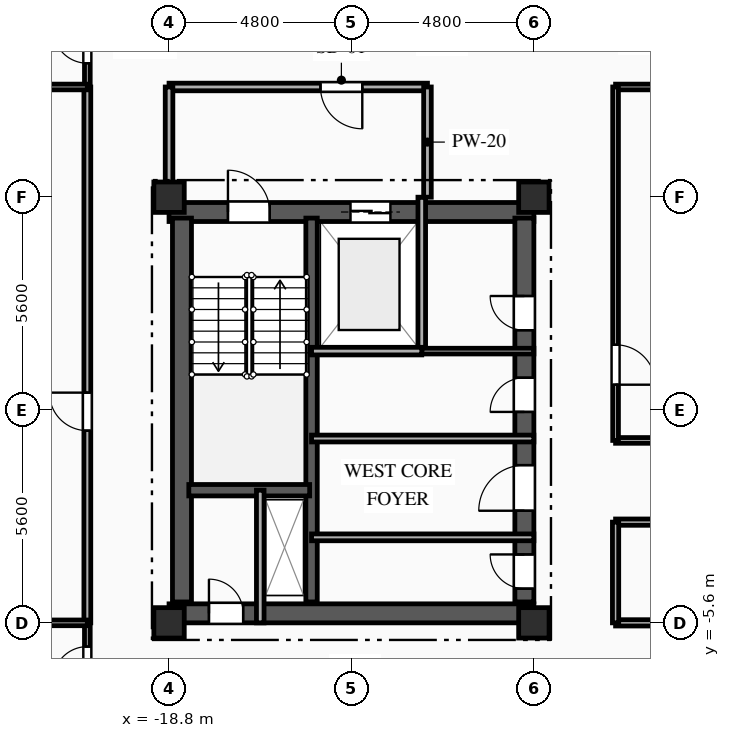
"""IFC4 building model, lengths in metres.
Left out: names, types, materials, properties, quantities, classifications, styles, units other than length and angle.
Written with IfcOpenShell. Run it as: python <this file> out.ifc"""

import sys

from ifc_helpers import new_model, si_unit, direction, frame, frame_2d, origin, origin_2d, place, context, subcontext, project, spatial, rectangle, extrude, element, fill, save


model = new_model("IFC4")
c1 = context("Model", 3, precision=1e-05, world=origin(), true_north=direction((0.0, 1.0)))
c2 = subcontext(c1, "Body", "Model", "MODEL_VIEW")
j1 = project(units=[si_unit("LENGTHUNIT", "METRE"), si_unit("PLANEANGLEUNIT", "RADIAN")], contexts=[c1])
p1 = place(None, origin())
s1 = spatial("IfcSite", under=j1, at=p1, CompositionType="ELEMENT")
p2 = place(p1, origin())
s2 = spatial("IfcBuilding", under=s1, at=p2, CompositionType="ELEMENT")
p3 = place(p2, frame((0.0, 0.0, 179.65)))
s3 = spatial("IfcBuildingStorey", under=s2, at=p3, CompositionType="ELEMENT", Elevation=179.65)
for number, where, z_axis, x_axis in (
    (1, (-18.8, -5.6, 0.0), (0.0, 0.0, 1.0), (1.0, 0.0, 0.0)),
    (2, (-18.8, 5.6, 0.0), (0.0, 0.0, 1.0), (1.0, 0.0, 0.0)),
    (3, (-9.2, -5.6, 0.0), (0.0, 0.0, 1.0), (1.0, 0.0, 0.0)),
    (4, (-9.2, 5.6, 0.0), (0.0, 0.0, 1.0), (1.0, 0.0, 0.0)),
):
    element("IfcColumn", number, at=place(p3, frame(where, z_axis=z_axis, x_axis=x_axis)), inside=s3, PredefinedType="COLUMN", context=c2, shape_type="SweptSolid", body=[
        extrude(rectangle(XDim=0.8, YDim=0.8, at=origin_2d()), origin(), (0.0, 0.0, 1.0), 3.35),
    ])
p4 = place(p3, frame((-18.8, 5.21, 0.0), z_axis=(0.0, 0.0, 1.0), x_axis=(1.0, 0.0, 0.0)))
e5 = element("IfcWall", 5, at=p4, inside=s3, PredefinedType="SHEAR", context=c2, shape_type="SweptSolid", body=[
    extrude(rectangle(XDim=9.6, YDim=0.5, at=frame_2d((4.8, 0.0))), origin(), (0.0, 0.0, 1.0), 3.04),
])
p5 = place(p4, frame((1.55, 0.0, 0.0)))
e6 = element("IfcOpeningElement", 6, at=p5, cuts=e5, PredefinedType="OPENING", context=c2, shape_type="SweptSolid", body=[
    extrude(rectangle(XDim=1.1, YDim=2.15, at=frame_2d((0.55, 1.075))), frame((0.0, 0.26, 0.0), z_axis=(0.0, -1.0, 0.0), x_axis=(1.0, 0.0, 0.0)), (0.0, 0.0, 1.0), 0.52),
])
p6 = place(p4, frame((4.775, 0.0, 0.0)))
e7 = element("IfcOpeningElement", 7, at=p6, cuts=e5, PredefinedType="OPENING", context=c2, shape_type="SweptSolid", body=[
    extrude(rectangle(XDim=1.05, YDim=2.1, at=frame_2d((0.525, 1.05))), frame((0.0, 0.26, 0.0), z_axis=(0.0, -1.0, 0.0), x_axis=(1.0, 0.0, 0.0)), (0.0, 0.0, 1.0), 0.52),
])
p7 = place(p3, frame((-18.8, -5.35, 0.0), z_axis=(0.0, 0.0, 1.0), x_axis=(1.0, 0.0, 0.0)))
e8 = element("IfcWall", 8, at=p7, inside=s3, PredefinedType="SHEAR", context=c2, shape_type="SweptSolid", body=[
    extrude(rectangle(XDim=9.6, YDim=0.5, at=frame_2d((4.8, 0.0))), origin(), (0.0, 0.0, 1.0), 3.04),
])
p8 = place(p7, frame((1.05, 0.0, 0.0)))
e9 = element("IfcOpeningElement", 9, at=p8, cuts=e8, PredefinedType="OPENING", context=c2, shape_type="SweptSolid", body=[
    extrude(rectangle(XDim=0.9, YDim=2.1, at=frame_2d((0.45, 1.05))), frame((0.0, 0.26, 0.0), z_axis=(0.0, -1.0, 0.0), x_axis=(1.0, 0.0, 0.0)), (0.0, 0.0, 1.0), 0.52),
])
p9 = place(p3, frame((-18.46, -5.05, 0.0), z_axis=(0.0, 0.0, 1.0), x_axis=(0.0, 1.0, 0.0)))
e10 = element("IfcWall", 10, at=p9, inside=s3, PredefinedType="SHEAR", context=c2, shape_type="SweptSolid", body=[
    extrude(rectangle(XDim=10.1, YDim=0.5, at=frame_2d((5.05, 0.0))), origin(), (0.0, 0.0, 1.0), 3.04),
])
p10 = place(p3, frame((-9.45, -5.05, 0.0), z_axis=(0.0, 0.0, 1.0), x_axis=(0.0, 1.0, 0.0)))
e11 = element("IfcWall", 11, at=p10, inside=s3, PredefinedType="SHEAR", context=c2, shape_type="SweptSolid", body=[
    extrude(rectangle(XDim=10.1, YDim=0.5, at=frame_2d((5.05, 0.0))), origin(), (0.0, 0.0, 1.0), 3.04),
])
p11 = place(p10, frame((7.15, 0.0, 0.0)))
e12 = element("IfcOpeningElement", 12, at=p11, cuts=e11, PredefinedType="OPENING", context=c2, shape_type="SweptSolid", body=[
    extrude(rectangle(XDim=0.9, YDim=2.1, at=frame_2d((0.45, 1.05))), frame((0.0, 0.26, 0.0), z_axis=(0.0, -1.0, 0.0), x_axis=(1.0, 0.0, 0.0)), (0.0, 0.0, 1.0), 0.52),
])
p12 = place(p10, frame((2.4, 0.0, 0.0)))
e13 = element("IfcOpeningElement", 13, at=p12, cuts=e11, PredefinedType="OPENING", context=c2, shape_type="SweptSolid", body=[
    extrude(rectangle(XDim=1.2, YDim=2.15, at=frame_2d((0.6, 1.075))), frame((0.0, 0.26, 0.0), z_axis=(0.0, -1.0, 0.0), x_axis=(1.0, 0.0, 0.0)), (0.0, 0.0, 1.0), 0.52),
])
p13 = place(p10, frame((0.35, 0.0, 0.0)))
e14 = element("IfcOpeningElement", 14, at=p13, cuts=e11, PredefinedType="OPENING", context=c2, shape_type="SweptSolid", body=[
    extrude(rectangle(XDim=0.9, YDim=2.1, at=frame_2d((0.45, 1.05))), frame((0.0, 0.26, 0.0), z_axis=(0.0, -1.0, 0.0), x_axis=(1.0, 0.0, 0.0)), (0.0, 0.0, 1.0), 0.52),
])
p14 = place(p10, frame((5.0, 0.0, 0.0)))
e15 = element("IfcOpeningElement", 15, at=p14, cuts=e11, PredefinedType="OPENING", context=c2, shape_type="SweptSolid", body=[
    extrude(rectangle(XDim=0.9, YDim=2.1, at=frame_2d((0.45, 1.05))), frame((0.0, 0.26, 0.0), z_axis=(0.0, -1.0, 0.0), x_axis=(1.0, 0.0, 0.0)), (0.0, 0.0, 1.0), 0.52),
])
p15 = place(p3, frame((-15.05, -5.05, 0.0), z_axis=(0.0, 0.0, 1.0), x_axis=(0.0, 1.0, 0.0)))
e16 = element("IfcWall", 16, at=p15, inside=s3, PredefinedType="SHEAR", context=c2, shape_type="SweptSolid", body=[
    extrude(rectangle(XDim=10.1, YDim=0.3, at=frame_2d((5.05, 0.0))), origin(), (0.0, 0.0, 1.0), 3.04),
])
p16 = place(p3, frame((-18.28, -2.11, 0.0), z_axis=(0.0, 0.0, 1.0), x_axis=(1.0, 0.0, 0.0)))
e17 = element("IfcWall", 17, at=p16, inside=s3, PredefinedType="SHEAR", context=c2, shape_type="SweptSolid", body=[
    extrude(rectangle(XDim=3.18, YDim=0.3, at=frame_2d((1.59, 0.0))), origin(), (0.0, 0.0, 1.0), 3.04),
])
p17 = place(p3, frame((-16.4, -5.6, 0.0), z_axis=(0.0, 0.0, 1.0), x_axis=(0.0, 1.0, 0.0)))
e18 = element("IfcWall", 18, at=p17, inside=s3, PredefinedType="PARTITIONING", context=c2, shape_type="SweptSolid", body=[
    extrude(rectangle(XDim=3.49, YDim=0.2, at=frame_2d((1.745, 0.0))), origin(), (0.0, 0.0, 1.0), 3.04),
])
p18 = place(p3, frame((-12.15, 1.55, 0.0), z_axis=(0.0, 0.0, 1.0), x_axis=(0.0, 1.0, 0.0)))
e19 = element("IfcWall", 19, at=p18, inside=s3, PredefinedType="PARTITIONING", context=c2, shape_type="SweptSolid", body=[
    extrude(rectangle(XDim=4.05, YDim=0.2, at=frame_2d((2.025, 0.0))), origin(), (0.0, 0.0, 1.0), 3.04),
])
p19 = place(p3, frame((-12.0, 8.5, 0.0), z_axis=(0.0, 0.0, 1.0), x_axis=(-1.0, 0.0, 0.0)))
e20 = element("IfcWall", 20, at=p19, inside=s3, PredefinedType="PARTITIONING", context=c2, shape_type="SweptSolid", body=[
    extrude(rectangle(XDim=6.8, YDim=0.2, at=frame_2d((3.4, 0.0))), origin(), (0.0, 0.0, 1.0), 3.04),
])
p20 = place(p19, frame((1.715, 0.0, 0.0)))
e21 = element("IfcOpeningElement", 21, at=p20, cuts=e20, PredefinedType="OPENING", context=c2, shape_type="SweptSolid", body=[
    extrude(rectangle(XDim=1.1, YDim=2.15, at=frame_2d((0.55, 1.075))), frame((0.0, 0.11, 0.0), z_axis=(0.0, -1.0, 0.0), x_axis=(1.0, 0.0, 0.0)), (0.0, 0.0, 1.0), 0.22),
])
p21 = place(p3, frame((-18.8, 8.5, 0.0), z_axis=(0.0, 0.0, 1.0), x_axis=(0.0, -1.0, 0.0)))
e22 = element("IfcWall", 22, at=p21, inside=s3, PredefinedType="PARTITIONING", context=c2, shape_type="SweptSolid", body=[
    extrude(rectangle(XDim=2.9, YDim=0.2, at=frame_2d((1.45, 0.0))), origin(), (0.0, 0.0, 1.0), 2.665),
])
p22 = place(p3, frame((-12.0, 5.6, 0.0), z_axis=(0.0, 0.0, 1.0), x_axis=(0.0, 1.0, 0.0)))
e23 = element("IfcWall", 23, at=p22, inside=s3, PredefinedType="PARTITIONING", context=c2, shape_type="SweptSolid", body=[
    extrude(rectangle(XDim=2.9, YDim=0.2, at=frame_2d((1.45, 0.0))), origin(), (0.0, 0.0, 1.0), 3.04),
])
p23 = place(p3, frame((-12.15, 1.55, 0.0), z_axis=(0.0, 0.0, 1.0), x_axis=(1.0, 0.0, 0.0)))
e24 = element("IfcWall", 24, at=p23, inside=s3, PredefinedType="PARTITIONING", context=c2, shape_type="SweptSolid", body=[
    extrude(rectangle(XDim=2.95, YDim=0.15, at=frame_2d((1.475, 0.0))), origin(), (0.0, 0.0, 1.0), 3.04),
])
p24 = place(p3, frame((-15.05, -3.35, 0.0), z_axis=(0.0, 0.0, 1.0), x_axis=(1.0, 0.0, 0.0)))
e25 = element("IfcWall", 25, at=p24, inside=s3, PredefinedType="PARTITIONING", context=c2, shape_type="SweptSolid", body=[
    extrude(rectangle(XDim=5.85, YDim=0.18, at=frame_2d((2.925, 0.0))), origin(), (0.0, 0.0, 1.0), 2.755),
])
p25 = place(p3, frame((-9.2, -0.75, 0.0), z_axis=(0.0, 0.0, 1.0), x_axis=(-1.0, 0.0, 0.0)))
e26 = element("IfcWall", 26, at=p25, inside=s3, PredefinedType="PARTITIONING", context=c2, shape_type="SweptSolid", body=[
    extrude(rectangle(XDim=5.85, YDim=0.18, at=frame_2d((2.925, 0.0))), origin(), (0.0, 0.0, 1.0), 3.04),
])
p26 = place(p3, frame((-20.95, 8.5, 0.0), z_axis=(0.0, 0.0, 1.0), x_axis=(0.0, 1.0, 0.0)))
e27 = element("IfcWall", 27, at=p26, inside=s3, PredefinedType="PARTITIONING", context=c2, shape_type="SweptSolid", body=[
    extrude(rectangle(XDim=2.15, YDim=0.15, at=frame_2d((1.075, 0.0))), origin(), (0.0, 0.0, 1.0), 3.04),
])
p27 = place(p26, frame((0.625, 0.0, 0.0)))
e28 = element("IfcOpeningElement", 28, at=p27, cuts=e27, PredefinedType="OPENING", context=c2, shape_type="SweptSolid", body=[
    extrude(rectangle(XDim=0.9, YDim=2.1, at=frame_2d((0.45, 1.05))), frame((0.0, 0.085, 0.0), z_axis=(0.0, -1.0, 0.0), x_axis=(1.0, 0.0, 0.0)), (0.0, 0.0, 1.0), 0.17),
])
p28 = place(p3, frame((0.0, 8.5, 0.0), z_axis=(0.0, 0.0, 1.0), x_axis=(-1.0, 0.0, 0.0)))
e29 = element("IfcWall", 29, at=p28, inside=s3, PredefinedType="PARTITIONING", context=c2, shape_type="SweptSolid", body=[
    extrude(rectangle(XDim=7.05, YDim=0.15, at=frame_2d((3.525, 0.0))), origin(), (0.0, 0.0, 1.0), 3.04),
])
p29 = place(p3, frame((-20.95, -7.75, 0.0), z_axis=(0.0, 0.0, 1.0), x_axis=(0.0, 1.0, 0.0)))
e30 = element("IfcWall", 30, at=p29, inside=s3, PredefinedType="PARTITIONING", context=c2, shape_type="SweptSolid", body=[
    extrude(rectangle(XDim=2.15, YDim=0.15, at=frame_2d((1.075, 0.0))), origin(), (0.0, 0.0, 1.0), 3.04),
])
p30 = place(p29, frame((0.625, 0.0, 0.0)))
e31 = element("IfcOpeningElement", 31, at=p30, cuts=e30, PredefinedType="OPENING", context=c2, shape_type="SweptSolid", body=[
    extrude(rectangle(XDim=0.9, YDim=2.1, at=frame_2d((0.45, 1.05))), frame((0.0, 0.085, 0.0), z_axis=(0.0, -1.0, 0.0), x_axis=(1.0, 0.0, 0.0)), (0.0, 0.0, 1.0), 0.17),
])
p31 = place(p3, frame((-7.05, -5.6, 0.0), z_axis=(0.0, 0.0, 1.0), x_axis=(1.0, 0.0, 0.0)))
e32 = element("IfcWall", 32, at=p31, inside=s3, PredefinedType="PARTITIONING", context=c2, shape_type="SweptSolid", body=[
    extrude(rectangle(XDim=7.05, YDim=0.165, at=frame_2d((3.525, 0.0))), origin(), (0.0, 0.0, 1.0), 2.525),
])
p32 = place(p3, frame((-20.95, -5.6, 0.0), z_axis=(0.0, 0.0, 1.0), x_axis=(0.0, 1.0, 0.0)))
e33 = element("IfcWall", 33, at=p32, inside=s3, PredefinedType="PARTITIONING", context=c2, shape_type="SweptSolid", body=[
    extrude(rectangle(XDim=14.1, YDim=0.18, at=frame_2d((7.05, 0.0))), origin(), (0.0, 0.0, 1.0), 3.04),
])
p33 = place(p32, frame((5.058, 0.0, 0.0)))
e34 = element("IfcOpeningElement", 34, at=p33, cuts=e33, PredefinedType="OPENING", context=c2, shape_type="SweptSolid", body=[
    extrude(rectangle(XDim=1.0, YDim=2.15, at=frame_2d((0.5, 1.075))), frame((0.0, 0.1, 0.0), z_axis=(0.0, -1.0, 0.0), x_axis=(1.0, 0.0, 0.0)), (0.0, 0.0, 1.0), 0.2),
])
p34 = place(p3, frame((-7.05, -0.8, 0.0), z_axis=(0.0, 0.0, 1.0), x_axis=(1.0, 0.0, 0.0)))
e35 = element("IfcWall", 35, at=p34, inside=s3, PredefinedType="PARTITIONING", context=c2, shape_type="SweptSolid", body=[
    extrude(rectangle(XDim=7.05, YDim=0.15, at=frame_2d((3.525, 0.0))), origin(), (0.0, 0.0, 1.0), 3.04),
])
p35 = place(p3, frame((7.05, -2.95, 0.0), z_axis=(0.0, 0.0, 1.0), x_axis=(-1.0, 0.0, 0.0)))
e36 = element("IfcWall", 36, at=p35, inside=s3, PredefinedType="PARTITIONING", context=c2, shape_type="SweptSolid", body=[
    extrude(rectangle(XDim=14.1, YDim=0.165, at=frame_2d((7.05, 0.0))), origin(), (0.0, 0.0, 1.0), 3.04),
])
p36 = place(p35, frame((6.475, 0.0, 0.0)))
e37 = element("IfcOpeningElement", 37, at=p36, cuts=e36, PredefinedType="OPENING", context=c2, shape_type="SweptSolid", body=[
    extrude(rectangle(XDim=1.15, YDim=2.15, at=frame_2d((0.575, 1.075))), frame((0.0, 0.093, 0.0), z_axis=(0.0, -1.0, 0.0), x_axis=(1.0, 0.0, 0.0)), (0.0, 0.0, 1.0), 0.185),
])
p37 = place(p3, frame((-7.05, 8.5, 0.0), z_axis=(0.0, 0.0, 1.0), x_axis=(0.0, -1.0, 0.0)))
e38 = element("IfcWall", 38, at=p37, inside=s3, PredefinedType="PARTITIONING", context=c2, shape_type="SweptSolid", body=[
    extrude(rectangle(XDim=9.3, YDim=0.15, at=frame_2d((4.65, 0.0))), origin(), (0.0, 0.0, 1.0), 3.04),
])
p38 = place(p37, frame((6.784, 0.0, 0.0)))
e39 = element("IfcOpeningElement", 39, at=p38, cuts=e38, PredefinedType="OPENING", context=c2, shape_type="SweptSolid", body=[
    extrude(rectangle(XDim=1.05, YDim=2.15, at=frame_2d((0.525, 1.075))), frame((0.0, 0.085, 0.0), z_axis=(0.0, -1.0, 0.0), x_axis=(1.0, 0.0, 0.0)), (0.0, 0.0, 1.0), 0.17),
])
p39 = place(p3, frame((-7.05, -2.95, 0.0), z_axis=(0.0, 0.0, 1.0), x_axis=(0.0, -1.0, 0.0)))
e40 = element("IfcWall", 40, at=p39, inside=s3, PredefinedType="PARTITIONING", context=c2, shape_type="SweptSolid", body=[
    extrude(rectangle(XDim=2.65, YDim=0.165, at=frame_2d((1.325, 0.0))), origin(), (0.0, 0.0, 1.0), 3.04),
])
p40 = place(p3, frame((-23.6, 8.5, 0.0), z_axis=(0.0, 0.0, 1.0), x_axis=(1.0, 0.0, 0.0)))
e41 = element("IfcWall", 41, at=p40, inside=s3, PredefinedType="PARTITIONING", context=c2, shape_type="SweptSolid", body=[
    extrude(rectangle(XDim=2.65, YDim=0.15, at=frame_2d((1.325, 0.0))), origin(), (0.0, 0.0, 1.0), 3.04),
])
p41 = place(p40, frame((0.635, 0.0, 0.0)))
e42 = element("IfcOpeningElement", 42, at=p41, cuts=e41, PredefinedType="OPENING", context=c2, shape_type="SweptSolid", body=[
    extrude(rectangle(XDim=1.05, YDim=2.15, at=frame_2d((0.525, 1.075))), frame((0.0, 0.085, 0.0), z_axis=(0.0, -1.0, 0.0), x_axis=(1.0, 0.0, 0.0)), (0.0, 0.0, 1.0), 0.17),
])
p42 = place(p3, frame((-20.95, -5.6, 0.0), z_axis=(0.0, 0.0, 1.0), x_axis=(-1.0, 0.0, 0.0)))
e43 = element("IfcWall", 43, at=p42, inside=s3, PredefinedType="PARTITIONING", context=c2, shape_type="SweptSolid", body=[
    extrude(rectangle(XDim=2.65, YDim=0.15, at=frame_2d((1.325, 0.0))), origin(), (0.0, 0.0, 1.0), 3.04),
])
p43 = place(p42, frame((0.965, 0.0, 0.0)))
e44 = element("IfcOpeningElement", 44, at=p43, cuts=e43, PredefinedType="OPENING", context=c2, shape_type="SweptSolid", body=[
    extrude(rectangle(XDim=1.05, YDim=2.15, at=frame_2d((0.525, 1.075))), frame((0.0, 0.085, 0.0), z_axis=(0.0, -1.0, 0.0), x_axis=(1.0, 0.0, 0.0)), (0.0, 0.0, 1.0), 0.17),
])
p44 = place(p3, frame((-15.05, 1.55, 0.0), z_axis=(0.0, 0.0, 1.0), x_axis=(1.0, 0.0, 0.0)))
e45 = element("IfcWall", 45, at=p44, inside=s3, PredefinedType="PARTITIONING", context=c2, shape_type="SweptSolid", body=[
    extrude(rectangle(XDim=2.9, YDim=0.2, at=frame_2d((1.45, 0.0))), origin(), (0.0, 0.0, 1.0), 3.04),
])
p45 = place(p5, origin())
e46 = element("IfcDoor", 46, at=p45, inside=s3, OperationType="SINGLE_SWING_LEFT", PredefinedType="DOOR", context=c2, shape_type="SweptSolid", body=[
    extrude(rectangle(XDim=1.1, YDim=2.15, at=frame_2d((0.55, 1.075))), frame((0.0, 0.025, 0.0), z_axis=(0.0, -1.0, 0.0), x_axis=(1.0, 0.0, 0.0)), (0.0, 0.0, 1.0), 0.05),
])
fill(e6, e46)
p46 = place(p6, origin())
e47 = element("IfcDoor", 47, at=p46, inside=s3, OperationType="DOUBLE_DOOR_SLIDING", PredefinedType="DOOR", context=c2, shape_type="SweptSolid", body=[
    extrude(rectangle(XDim=1.05, YDim=2.1, at=frame_2d((0.525, 1.05))), frame((0.0, 0.025, 0.0), z_axis=(0.0, -1.0, 0.0), x_axis=(1.0, 0.0, 0.0)), (0.0, 0.0, 1.0), 0.05),
])
fill(e7, e47)
p47 = place(p8, origin())
e48 = element("IfcDoor", 48, at=p47, inside=s3, OperationType="SINGLE_SWING_LEFT", PredefinedType="DOOR", context=c2, shape_type="SweptSolid", body=[
    extrude(rectangle(XDim=0.9, YDim=2.1, at=frame_2d((0.45, 1.05))), frame((0.0, 0.025, 0.0), z_axis=(0.0, -1.0, 0.0), x_axis=(1.0, 0.0, 0.0)), (0.0, 0.0, 1.0), 0.05),
])
fill(e9, e48)
p48 = place(p20, origin())
e49 = element("IfcDoor", 49, at=p48, inside=s3, OperationType="SINGLE_SWING_LEFT", PredefinedType="DOOR", context=c2, shape_type="SweptSolid", body=[
    extrude(rectangle(XDim=1.1, YDim=2.15, at=frame_2d((0.55, 1.075))), frame((0.0, 0.025, 0.0), z_axis=(0.0, -1.0, 0.0), x_axis=(1.0, 0.0, 0.0)), (0.0, 0.0, 1.0), 0.05),
])
fill(e21, e49)
p49 = place(p11, origin())
e50 = element("IfcDoor", 50, at=p49, inside=s3, OperationType="SINGLE_SWING_RIGHT", PredefinedType="DOOR", context=c2, shape_type="SweptSolid", body=[
    extrude(rectangle(XDim=0.9, YDim=2.1, at=frame_2d((0.45, 1.05))), frame((0.0, 0.025, 0.0), z_axis=(0.0, -1.0, 0.0), x_axis=(1.0, 0.0, 0.0)), (0.0, 0.0, 1.0), 0.05),
])
fill(e12, e50)
p50 = place(p12, origin())
e51 = element("IfcDoor", 51, at=p50, inside=s3, OperationType="SINGLE_SWING_LEFT", PredefinedType="DOOR", context=c2, shape_type="SweptSolid", body=[
    extrude(rectangle(XDim=1.2, YDim=2.15, at=frame_2d((0.6, 1.075))), frame((0.0, 0.025, 0.0), z_axis=(0.0, -1.0, 0.0), x_axis=(1.0, 0.0, 0.0)), (0.0, 0.0, 1.0), 0.05),
])
fill(e13, e51)
p51 = place(p13, origin())
e52 = element("IfcDoor", 52, at=p51, inside=s3, OperationType="SINGLE_SWING_RIGHT", PredefinedType="DOOR", context=c2, shape_type="SweptSolid", body=[
    extrude(rectangle(XDim=0.9, YDim=2.1, at=frame_2d((0.45, 1.05))), frame((0.0, 0.025, 0.0), z_axis=(0.0, -1.0, 0.0), x_axis=(1.0, 0.0, 0.0)), (0.0, 0.0, 1.0), 0.05),
])
fill(e14, e52)
p52 = place(p14, origin())
e53 = element("IfcDoor", 53, at=p52, inside=s3, OperationType="SINGLE_SWING_LEFT", PredefinedType="DOOR", context=c2, shape_type="SweptSolid", body=[
    extrude(rectangle(XDim=0.9, YDim=2.1, at=frame_2d((0.45, 1.05))), frame((0.0, 0.025, 0.0), z_axis=(0.0, -1.0, 0.0), x_axis=(1.0, 0.0, 0.0)), (0.0, 0.0, 1.0), 0.05),
])
fill(e15, e53)
p53 = place(p27, origin())
e54 = element("IfcDoor", 54, at=p53, inside=s3, OperationType="SINGLE_SWING_RIGHT", PredefinedType="DOOR", context=c2, shape_type="SweptSolid", body=[
    extrude(rectangle(XDim=0.9, YDim=2.1, at=frame_2d((0.45, 1.05))), frame((0.0, 0.025, 0.0), z_axis=(0.0, -1.0, 0.0), x_axis=(1.0, 0.0, 0.0)), (0.0, 0.0, 1.0), 0.05),
])
fill(e28, e54)
p54 = place(p30, origin())
e55 = element("IfcDoor", 55, at=p54, inside=s3, OperationType="SINGLE_SWING_LEFT", PredefinedType="DOOR", context=c2, shape_type="SweptSolid", body=[
    extrude(rectangle(XDim=0.9, YDim=2.1, at=frame_2d((0.45, 1.05))), frame((0.0, 0.025, 0.0), z_axis=(0.0, -1.0, 0.0), x_axis=(1.0, 0.0, 0.0)), (0.0, 0.0, 1.0), 0.05),
])
fill(e31, e55)
p55 = place(p33, origin())
e56 = element("IfcDoor", 56, at=p55, inside=s3, OperationType="SINGLE_SWING_RIGHT", PredefinedType="DOOR", context=c2, shape_type="SweptSolid", body=[
    extrude(rectangle(XDim=1.0, YDim=2.15, at=frame_2d((0.5, 1.075))), frame((0.0, 0.025, 0.0), z_axis=(0.0, -1.0, 0.0), x_axis=(1.0, 0.0, 0.0)), (0.0, 0.0, 1.0), 0.05),
])
fill(e34, e56)
p56 = place(p38, origin())
e57 = element("IfcDoor", 57, at=p56, inside=s3, OperationType="SINGLE_SWING_RIGHT", PredefinedType="DOOR", context=c2, shape_type="SweptSolid", body=[
    extrude(rectangle(XDim=1.05, YDim=2.15, at=frame_2d((0.525, 1.075))), frame((0.0, 0.025, 0.0), z_axis=(0.0, -1.0, 0.0), x_axis=(1.0, 0.0, 0.0)), (0.0, 0.0, 1.0), 0.05),
])
fill(e39, e57)
save(model, sys.argv[1])
